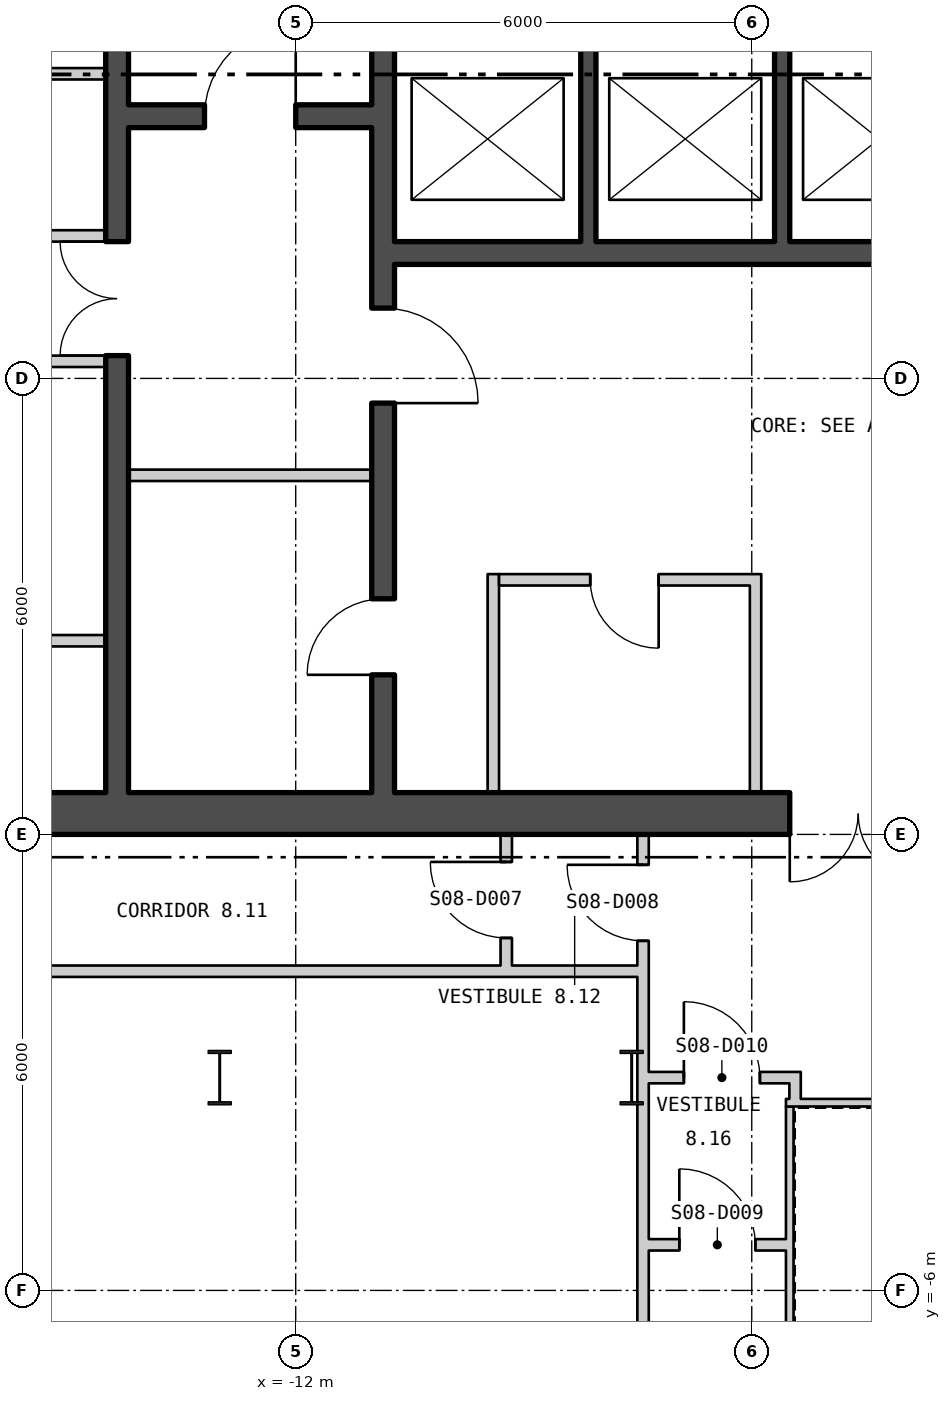
"""IFC4 building model, lengths in metres.
Left out: names, types, materials, properties, quantities, classifications, styles, units other than length and angle.
Written with IfcOpenShell. Run it as: python <this file> out.ifc"""

import sys

from ifc_helpers import new_model, si_unit, direction, frame, frame_2d, origin, origin_2d, place, context, subcontext, project, spatial, polyline, rectangle, i_section, outline, extrude, element, fill, save


model = new_model("IFC4")
c1 = context("Model", 3, precision=1e-05, world=origin(), true_north=direction((0.0, 1.0)))
c2 = subcontext(c1, "Body", "Model", "MODEL_VIEW")
j1 = project(units=[si_unit("LENGTHUNIT", "METRE"), si_unit("PLANEANGLEUNIT", "RADIAN")], contexts=[c1])
p1 = place(None, origin())
s1 = spatial("IfcSite", under=j1, at=p1, CompositionType="ELEMENT")
p2 = place(p1, origin())
s2 = spatial("IfcBuilding", under=s1, at=p2, CompositionType="ELEMENT")
p3 = place(p2, frame((0.0, 0.0, 111.3)))
s3 = spatial("IfcBuildingStorey", under=s2, at=p3, CompositionType="ELEMENT", Elevation=111.3)
for number, where, z_axis, x_axis in (
    (1, (-7.58, -3.2, 0.0), (0.0, 0.0, 1.0), (1.0, 0.0, 0.0)),
    (2, (-13.0, -3.2, 0.0), (0.0, 0.0, 1.0), (1.0, 0.0, 0.0)),
):
    element("IfcColumn", number, at=place(p3, frame(where, z_axis=z_axis, x_axis=x_axis)), inside=s3, PredefinedType="COLUMN", context=c2, shape_type="SweptSolid", body=[
        extrude(i_section(OverallWidth=0.304, OverallDepth=0.716, WebThickness=0.021, FlangeThickness=0.04, at=origin_2d()), origin(), (0.0, 0.0, 1.0), 4.5),
    ])
p4 = place(p3, frame((-27.595, 11.782, -0.18), z_axis=(0.0, 0.0, 1.0), x_axis=(0.500000141277, -0.866025322218, 0.0)))
e3 = element("IfcWall", 3, at=p4, inside=s3, PredefinedType="SOLIDWALL", context=c2, shape_type="SweptSolid", body=[
    extrude(outline(polyline([(-0.13, -0.225), (45.86, -0.225), (45.6, 0.225), (0.13, 0.225), (-0.13, -0.225)])), origin(), (0.0, 0.0, 1.0), 4.28),
])
p5 = place(p4, frame((1.424, 0.0, 1.08)))
e4 = element("IfcOpeningElement", 4, at=p5, cuts=e3, PredefinedType="OPENING", context=c2, shape_type="SweptSolid", body=[
    extrude(rectangle(XDim=2.4, YDim=2.6, at=frame_2d((1.2, 1.3))), frame((0.0, 0.235, 0.0), z_axis=(0.0, -1.0, 0.0), x_axis=(1.0, 0.0, 0.0)), (0.0, 0.0, 1.0), 0.47),
])
p6 = place(p4, frame((5.892, 0.0, 1.08)))
e5 = element("IfcOpeningElement", 5, at=p6, cuts=e3, PredefinedType="OPENING", context=c2, shape_type="SweptSolid", body=[
    extrude(rectangle(XDim=2.4, YDim=2.6, at=frame_2d((1.2, 1.3))), frame((0.0, 0.235, 0.0), z_axis=(0.0, -1.0, 0.0), x_axis=(1.0, 0.0, 0.0)), (0.0, 0.0, 1.0), 0.47),
])
p7 = place(p4, frame((10.399, 0.0, 1.08)))
e6 = element("IfcOpeningElement", 6, at=p7, cuts=e3, PredefinedType="OPENING", context=c2, shape_type="SweptSolid", body=[
    extrude(rectangle(XDim=2.4, YDim=2.6, at=frame_2d((1.2, 1.3))), frame((0.0, 0.235, 0.0), z_axis=(0.0, -1.0, 0.0), x_axis=(1.0, 0.0, 0.0)), (0.0, 0.0, 1.0), 0.47),
])
p8 = place(p4, frame((14.905, 0.0, 1.08)))
e7 = element("IfcOpeningElement", 7, at=p8, cuts=e3, PredefinedType="OPENING", context=c2, shape_type="SweptSolid", body=[
    extrude(rectangle(XDim=2.4, YDim=2.6, at=frame_2d((1.2, 1.3))), frame((0.0, 0.235, 0.0), z_axis=(0.0, -1.0, 0.0), x_axis=(1.0, 0.0, 0.0)), (0.0, 0.0, 1.0), 0.47),
])
p9 = place(p4, frame((19.412, 0.0, 1.08)))
e8 = element("IfcOpeningElement", 8, at=p9, cuts=e3, PredefinedType="OPENING", context=c2, shape_type="SweptSolid", body=[
    extrude(rectangle(XDim=2.4, YDim=2.6, at=frame_2d((1.2, 1.3))), frame((0.0, 0.235, 0.0), z_axis=(0.0, -1.0, 0.0), x_axis=(1.0, 0.0, 0.0)), (0.0, 0.0, 1.0), 0.47),
])
p10 = place(p4, frame((23.918, 0.0, 1.08)))
e9 = element("IfcOpeningElement", 9, at=p10, cuts=e3, PredefinedType="OPENING", context=c2, shape_type="SweptSolid", body=[
    extrude(rectangle(XDim=2.4, YDim=2.6, at=frame_2d((1.2, 1.3))), frame((0.0, 0.235, 0.0), z_axis=(0.0, -1.0, 0.0), x_axis=(1.0, 0.0, 0.0)), (0.0, 0.0, 1.0), 0.47),
])
p11 = place(p4, frame((28.425, 0.0, 1.08)))
e10 = element("IfcOpeningElement", 10, at=p11, cuts=e3, PredefinedType="OPENING", context=c2, shape_type="SweptSolid", body=[
    extrude(rectangle(XDim=2.4, YDim=2.6, at=frame_2d((1.2, 1.3))), frame((0.0, 0.235, 0.0), z_axis=(0.0, -1.0, 0.0), x_axis=(1.0, 0.0, 0.0)), (0.0, 0.0, 1.0), 0.47),
])
p12 = place(p4, frame((32.932, 0.0, 1.08)))
e11 = element("IfcOpeningElement", 11, at=p12, cuts=e3, PredefinedType="OPENING", context=c2, shape_type="SweptSolid", body=[
    extrude(rectangle(XDim=2.4, YDim=2.6, at=frame_2d((1.2, 1.3))), frame((0.0, 0.235, 0.0), z_axis=(0.0, -1.0, 0.0), x_axis=(1.0, 0.0, 0.0)), (0.0, 0.0, 1.0), 0.47),
])
p13 = place(p4, frame((37.438, 0.0, 1.08)))
e12 = element("IfcOpeningElement", 12, at=p13, cuts=e3, PredefinedType="OPENING", context=c2, shape_type="SweptSolid", body=[
    extrude(rectangle(XDim=2.4, YDim=2.6, at=frame_2d((1.2, 1.3))), frame((0.0, 0.235, 0.0), z_axis=(0.0, -1.0, 0.0), x_axis=(1.0, 0.0, 0.0)), (0.0, 0.0, 1.0), 0.47),
])
p14 = place(p4, frame((41.907, 0.0, 1.08)))
e13 = element("IfcOpeningElement", 13, at=p14, cuts=e3, PredefinedType="OPENING", context=c2, shape_type="SweptSolid", body=[
    extrude(rectangle(XDim=2.4, YDim=2.6, at=frame_2d((1.2, 1.3))), frame((0.0, 0.235, 0.0), z_axis=(0.0, -1.0, 0.0), x_axis=(1.0, 0.0, 0.0)), (0.0, 0.0, 1.0), 0.47),
])
p15 = place(p3, frame((5.55, -3.53, 0.0), z_axis=(0.0, 0.0, 1.0), x_axis=(-1.0, 0.0, 0.0)))
e14 = element("IfcWall", 14, at=p15, inside=s3, PredefinedType="PARTITIONING", context=c2, shape_type="SweptSolid", body=[
    extrude(rectangle(XDim=11.1, YDim=0.1, at=frame_2d((5.55, 0.0))), origin(), (0.0, 0.0, 1.0), 4.3),
])
p16 = place(p3, frame((-5.5, -3.58, 0.0), z_axis=(0.0, 0.0, 1.0), x_axis=(0.0, -1.0, 0.0)))
e15 = element("IfcWall", 15, at=p16, inside=s3, PredefinedType="PARTITIONING", context=c2, shape_type="SweptSolid", body=[
    extrude(rectangle(XDim=8.04, YDim=0.1, at=frame_2d((4.02, 0.0))), origin(), (0.0, 0.0, 1.0), 4.3),
])
p17 = place(p3, frame((-17.5, 0.275, 0.0), z_axis=(0.0, 0.0, 1.0), x_axis=(1.0, 0.0, 0.0)))
e16 = element("IfcWall", 16, at=p17, inside=s3, PredefinedType="SHEAR", context=c2, shape_type="SweptSolid", body=[
    extrude(rectangle(XDim=35.0, YDim=0.55, at=frame_2d((17.5, 0.0))), origin(), (0.0, 0.0, 1.0), 4.3),
])
p18 = place(p17, frame((12.0, 0.0, 0.0)))
e17 = element("IfcOpeningElement", 17, at=p18, cuts=e16, PredefinedType="OPENING", context=c2, shape_type="SweptSolid", body=[
    extrude(rectangle(XDim=1.8, YDim=2.4, at=frame_2d((0.9, 1.2))), frame((0.0, 0.285, 0.0), z_axis=(0.0, -1.0, 0.0), x_axis=(1.0, 0.0, 0.0)), (0.0, 0.0, 1.0), 0.57),
])
p19 = place(p17, frame((22.0, 0.0, 0.0)))
e18 = element("IfcOpeningElement", 18, at=p19, cuts=e16, PredefinedType="OPENING", context=c2, shape_type="SweptSolid", body=[
    extrude(rectangle(XDim=1.8, YDim=2.4, at=frame_2d((0.9, 1.2))), frame((0.0, 0.285, 0.0), z_axis=(0.0, -1.0, 0.0), x_axis=(1.0, 0.0, 0.0)), (0.0, 0.0, 1.0), 0.57),
])
p20 = place(p3, frame((-10.85, 0.55, 0.0), z_axis=(0.0, 0.0, 1.0), x_axis=(0.0, 1.0, 0.0)))
e19 = element("IfcWall", 19, at=p20, inside=s3, PredefinedType="SHEAR", context=c2, shape_type="SweptSolid", body=[
    extrude(rectangle(XDim=16.9, YDim=0.3, at=frame_2d((8.45, 0.0))), origin(), (0.0, 0.0, 1.0), 4.3),
])
p21 = place(p20, frame((5.125, 0.0, 0.0)))
e20 = element("IfcOpeningElement", 20, at=p21, cuts=e19, PredefinedType="OPENING", context=c2, shape_type="SweptSolid", body=[
    extrude(rectangle(XDim=1.25, YDim=2.1, at=frame_2d((0.625, 1.05))), frame((0.0, 0.16, 0.0), z_axis=(0.0, -1.0, 0.0), x_axis=(1.0, 0.0, 0.0)), (0.0, 0.0, 1.0), 0.32),
])
p22 = place(p20, frame((1.55, 0.0, 0.0)))
e21 = element("IfcOpeningElement", 21, at=p22, cuts=e19, PredefinedType="OPENING", context=c2, shape_type="SweptSolid", body=[
    extrude(rectangle(XDim=1.0, YDim=2.1, at=frame_2d((0.5, 1.05))), frame((0.0, 0.16, 0.0), z_axis=(0.0, -1.0, 0.0), x_axis=(1.0, 0.0, 0.0)), (0.0, 0.0, 1.0), 0.32),
])
p23 = place(p3, frame((-14.35, 0.55, 0.0), z_axis=(0.0, 0.0, 1.0), x_axis=(0.0, 1.0, 0.0)))
e22 = element("IfcWall", 22, at=p23, inside=s3, PredefinedType="SHEAR", context=c2, shape_type="SweptSolid", body=[
    extrude(rectangle(XDim=16.9, YDim=0.3, at=frame_2d((8.45, 0.0))), origin(), (0.0, 0.0, 1.0), 4.3),
])
p24 = place(p23, frame((5.75, 0.0, 0.0)))
e23 = element("IfcOpeningElement", 23, at=p24, cuts=e22, PredefinedType="OPENING", context=c2, shape_type="SweptSolid", body=[
    extrude(rectangle(XDim=1.5, YDim=2.1, at=frame_2d((0.75, 1.05))), frame((0.0, 0.16, 0.0), z_axis=(0.0, -1.0, 0.0), x_axis=(1.0, 0.0, 0.0)), (0.0, 0.0, 1.0), 0.32),
])
p25 = place(p3, frame((-14.2, 9.45, 0.0), z_axis=(0.0, 0.0, 1.0), x_axis=(1.0, 0.0, 0.0)))
e24 = element("IfcWall", 24, at=p25, inside=s3, PredefinedType="SHEAR", context=c2, shape_type="SweptSolid", body=[
    extrude(rectangle(XDim=3.2, YDim=0.3, at=frame_2d((1.6, 0.0))), origin(), (0.0, 0.0, 1.0), 4.3),
])
p26 = place(p25, frame((1.0, 0.0, 0.0)))
e25 = element("IfcOpeningElement", 25, at=p26, cuts=e24, PredefinedType="OPENING", context=c2, shape_type="SweptSolid", body=[
    extrude(rectangle(XDim=1.2, YDim=2.1, at=frame_2d((0.6, 1.05))), frame((0.0, 0.16, 0.0), z_axis=(0.0, -1.0, 0.0), x_axis=(1.0, 0.0, 0.0)), (0.0, 0.0, 1.0), 0.32),
])
p27 = place(p3, frame((-10.7, 7.65, 0.0), z_axis=(0.0, 0.0, 1.0), x_axis=(1.0, 0.0, 0.0)))
e26 = element("IfcWall", 26, at=p27, inside=s3, PredefinedType="SHEAR", context=c2, shape_type="SweptSolid", body=[
    extrude(rectangle(XDim=10.3, YDim=0.3, at=frame_2d((5.15, 0.0))), origin(), (0.0, 0.0, 1.0), 4.3),
])
for number, where, z_axis, x_axis in (
    (27, (-8.15, 7.8, 0.0), (0.0, 0.0, 1.0), (0.0, 1.0, 0.0)),
    (28, (-5.6, 7.8, 0.0), (0.0, 0.0, 1.0), (0.0, 1.0, 0.0)),
):
    element("IfcWall", number, at=place(p3, frame(where, z_axis=z_axis, x_axis=x_axis)), inside=s3, PredefinedType="SHEAR", context=c2, shape_type="SweptSolid", body=[
        extrude(rectangle(XDim=2.7, YDim=0.2, at=frame_2d((1.35, 0.0))), origin(), (0.0, 0.0, 1.0), 4.3),
    ])
p28 = place(p3, frame((-14.2, 4.725, 0.0), z_axis=(0.0, 0.0, 1.0), x_axis=(1.0, 0.0, 0.0)))
e29 = element("IfcWall", 29, at=p28, inside=s3, PredefinedType="PARTITIONING", context=c2, shape_type="SweptSolid", body=[
    extrude(rectangle(XDim=3.2, YDim=0.15, at=frame_2d((1.6, 0.0))), origin(), (0.0, 0.0, 1.0), 4.3),
])
for number, where, z_axis, x_axis in (
    (30, (-16.95, 6.225, 0.0), (0.0, 0.0, 1.0), (1.0, 0.0, 0.0)),
    (31, (-16.95, 7.875, 0.0), (0.0, 0.0, 1.0), (1.0, 0.0, 0.0)),
    (32, (-16.95, 2.549, 0.0), (0.0, 0.0, 1.0), (1.0, 0.0, 0.0)),
    (33, (-16.95, 10.008, 0.0), (0.0, 0.0, 1.0), (1.0, 0.0, 0.0)),
):
    element("IfcWall", number, at=place(p3, frame(where, z_axis=z_axis, x_axis=x_axis)), inside=s3, PredefinedType="PARTITIONING", context=c2, shape_type="SweptSolid", body=[
        extrude(rectangle(XDim=2.45, YDim=0.15, at=frame_2d((1.225, 0.0))), origin(), (0.0, 0.0, 1.0), 4.3),
    ])
for number, where, z_axis, x_axis in (
    (34, (-9.4, 0.55, 0.0), (0.0, 0.0, 1.0), (0.0, 1.0, 0.0)),
    (35, (-5.95, 0.55, 0.0), (0.0, 0.0, 1.0), (0.0, 1.0, 0.0)),
):
    element("IfcWall", number, at=place(p3, frame(where, z_axis=z_axis, x_axis=x_axis)), inside=s3, PredefinedType="PARTITIONING", context=c2, shape_type="SweptSolid", body=[
        extrude(rectangle(XDim=2.875, YDim=0.15, at=frame_2d((1.438, 0.0))), origin(), (0.0, 0.0, 1.0), 4.3),
    ])
p29 = place(p3, frame((-9.325, 3.35, 0.0), z_axis=(0.0, 0.0, 1.0), x_axis=(1.0, 0.0, 0.0)))
e36 = element("IfcWall", 36, at=p29, inside=s3, PredefinedType="PARTITIONING", context=c2, shape_type="SweptSolid", body=[
    extrude(rectangle(XDim=3.3, YDim=0.15, at=frame_2d((1.65, 0.0))), origin(), (0.0, 0.0, 1.0), 4.3),
])
p30 = place(p29, frame((1.2, 0.0, 0.0)))
e37 = element("IfcOpeningElement", 37, at=p30, cuts=e36, PredefinedType="OPENING", context=c2, shape_type="SweptSolid", body=[
    extrude(rectangle(XDim=0.9, YDim=2.1, at=frame_2d((0.45, 1.05))), frame((0.0, 0.085, 0.0), z_axis=(0.0, -1.0, 0.0), x_axis=(1.0, 0.0, 0.0)), (0.0, 0.0, 1.0), 0.17),
])
p31 = place(p3, frame((-19.225, -1.8, 0.0), z_axis=(0.0, 0.0, 1.0), x_axis=(1.0, 0.0, 0.0)))
e38 = element("IfcWall", 38, at=p31, inside=s3, PredefinedType="PARTITIONING", context=c2, shape_type="SweptSolid", body=[
    extrude(rectangle(XDim=11.72, YDim=0.15, at=frame_2d((5.86, 0.0))), origin(), (0.0, 0.0, 1.0), 4.3),
])
p32 = place(p3, frame((-9.23, -1.725, 0.0), z_axis=(0.0, 0.0, 1.0), x_axis=(0.0, 1.0, 0.0)))
e39 = element("IfcWall", 39, at=p32, inside=s3, PredefinedType="PARTITIONING", context=c2, shape_type="SweptSolid", body=[
    extrude(rectangle(XDim=1.725, YDim=0.15, at=frame_2d((0.863, 0.0))), origin(), (0.0, 0.0, 1.0), 4.3),
])
p33 = place(p32, frame((0.363, 0.0, 0.0)))
e40 = element("IfcOpeningElement", 40, at=p33, cuts=e39, PredefinedType="OPENING", context=c2, shape_type="SweptSolid", body=[
    extrude(rectangle(XDim=1.0, YDim=2.1, at=frame_2d((0.5, 1.05))), frame((0.0, 0.085, 0.0), z_axis=(0.0, -1.0, 0.0), x_axis=(1.0, 0.0, 0.0)), (0.0, 0.0, 1.0), 0.17),
])
p34 = place(p3, frame((-7.43, -13.675, 0.0), z_axis=(0.0, 0.0, 1.0), x_axis=(0.0, 1.0, 0.0)))
e41 = element("IfcWall", 41, at=p34, inside=s3, PredefinedType="PARTITIONING", context=c2, shape_type="SweptSolid", body=[
    extrude(rectangle(XDim=10.167, YDim=0.15, at=frame_2d((5.083, 0.0))), origin(), (0.0, 0.0, 1.0), 3.7),
])
p35 = place(p3, frame((-7.43, -3.508, 0.0), z_axis=(0.0, 0.0, 1.0), x_axis=(0.0, 1.0, 0.0)))
e42 = element("IfcWall", 42, at=p35, inside=s3, PredefinedType="PARTITIONING", context=c2, shape_type="SweptSolid", body=[
    extrude(rectangle(XDim=3.508, YDim=0.15, at=frame_2d((1.754, 0.0))), origin(), (0.0, 0.0, 1.0), 4.3),
])
p36 = place(p35, frame((2.108, 0.0, 0.0)))
e43 = element("IfcOpeningElement", 43, at=p36, cuts=e42, PredefinedType="OPENING", context=c2, shape_type="SweptSolid", body=[
    extrude(rectangle(XDim=1.0, YDim=2.1, at=frame_2d((0.5, 1.05))), frame((0.0, 0.085, 0.0), z_axis=(0.0, -1.0, 0.0), x_axis=(1.0, 0.0, 0.0)), (0.0, 0.0, 1.0), 0.17),
])
p37 = place(p3, frame((-7.355, -5.4, 0.0), z_axis=(0.0, 0.0, 1.0), x_axis=(1.0, 0.0, 0.0)))
e44 = element("IfcWall", 44, at=p37, inside=s3, PredefinedType="PARTITIONING", context=c2, shape_type="SweptSolid", body=[
    extrude(rectangle(XDim=1.805, YDim=0.15, at=frame_2d((0.902, 0.0))), origin(), (0.0, 0.0, 1.0), 4.3),
])
p38 = place(p37, frame((0.402, 0.0, 0.0)))
e45 = element("IfcOpeningElement", 45, at=p38, cuts=e44, PredefinedType="OPENING", context=c2, shape_type="SweptSolid", body=[
    extrude(rectangle(XDim=1.0, YDim=2.1, at=frame_2d((0.5, 1.05))), frame((0.0, 0.085, 0.0), z_axis=(0.0, -1.0, 0.0), x_axis=(1.0, 0.0, 0.0)), (0.0, 0.0, 1.0), 0.17),
])
p39 = place(p3, frame((-7.355, -3.2, 0.0), z_axis=(0.0, 0.0, 1.0), x_axis=(1.0, 0.0, 0.0)))
e46 = element("IfcWall", 46, at=p39, inside=s3, PredefinedType="PARTITIONING", context=c2, shape_type="SweptSolid", body=[
    extrude(rectangle(XDim=2.0, YDim=0.15, at=frame_2d((1.0, 0.0))), origin(), (0.0, 0.0, 1.0), 3.39),
])
p40 = place(p39, frame((0.462, 0.0, 0.0)))
e47 = element("IfcOpeningElement", 47, at=p40, cuts=e46, PredefinedType="OPENING", context=c2, shape_type="SweptSolid", body=[
    extrude(rectangle(XDim=1.0, YDim=2.1, at=frame_2d((0.5, 1.05))), frame((0.0, 0.085, 0.0), z_axis=(0.0, -1.0, 0.0), x_axis=(1.0, 0.0, 0.0)), (0.0, 0.0, 1.0), 0.17),
])
p41 = place(p3, frame((-5.43, -3.48, 0.0), z_axis=(0.0, 0.0, 1.0), x_axis=(0.0, 1.0, 0.0)))
e48 = element("IfcWall", 48, at=p41, inside=s3, PredefinedType="PARTITIONING", context=c2, shape_type="SweptSolid", body=[
    extrude(rectangle(XDim=0.205, YDim=0.15, at=frame_2d((0.102, 0.0))), origin(), (0.0, 0.0, 1.0), 4.3),
])
p42 = place(p26, origin())
e49 = element("IfcDoor", 49, at=p42, inside=s3, OperationType="SINGLE_SWING_LEFT", PredefinedType="DOOR", context=c2, shape_type="SweptSolid", body=[
    extrude(rectangle(XDim=1.2, YDim=2.1, at=frame_2d((0.6, 1.05))), frame((0.0, 0.025, 0.0), z_axis=(0.0, -1.0, 0.0), x_axis=(1.0, 0.0, 0.0)), (0.0, 0.0, 1.0), 0.05),
])
fill(e25, e49)
p43 = place(p21, origin())
e50 = element("IfcDoor", 50, at=p43, inside=s3, OperationType="SINGLE_SWING_LEFT", PredefinedType="DOOR", context=c2, shape_type="SweptSolid", body=[
    extrude(rectangle(XDim=1.25, YDim=2.1, at=frame_2d((0.625, 1.05))), frame((0.0, 0.025, 0.0), z_axis=(0.0, -1.0, 0.0), x_axis=(1.0, 0.0, 0.0)), (0.0, 0.0, 1.0), 0.05),
])
fill(e20, e50)
p44 = place(p22, origin())
e51 = element("IfcDoor", 51, at=p44, inside=s3, OperationType="SINGLE_SWING_RIGHT", PredefinedType="DOOR", context=c2, shape_type="SweptSolid", body=[
    extrude(rectangle(XDim=1.0, YDim=2.1, at=frame_2d((0.5, 1.05))), frame((0.0, 0.025, 0.0), z_axis=(0.0, -1.0, 0.0), x_axis=(1.0, 0.0, 0.0)), (0.0, 0.0, 1.0), 0.05),
])
fill(e21, e51)
p45 = place(p24, origin())
e52 = element("IfcDoor", 52, at=p45, inside=s3, OperationType="DOUBLE_DOOR_SINGLE_SWING", PredefinedType="DOOR", context=c2, shape_type="SweptSolid", body=[
    extrude(rectangle(XDim=1.5, YDim=2.1, at=frame_2d((0.75, 1.05))), frame((0.0, 0.025, 0.0), z_axis=(0.0, -1.0, 0.0), x_axis=(1.0, 0.0, 0.0)), (0.0, 0.0, 1.0), 0.05),
])
fill(e23, e52)
p46 = place(p30, origin())
e53 = element("IfcDoor", 53, at=p46, inside=s3, OperationType="SINGLE_SWING_RIGHT", PredefinedType="DOOR", context=c2, shape_type="SweptSolid", body=[
    extrude(rectangle(XDim=0.9, YDim=2.1, at=frame_2d((0.45, 1.05))), frame((0.0, 0.025, 0.0), z_axis=(0.0, -1.0, 0.0), x_axis=(1.0, 0.0, 0.0)), (0.0, 0.0, 1.0), 0.05),
])
fill(e37, e53)
p47 = place(p18, origin())
e54 = element("IfcDoor", 54, at=p47, inside=s3, OperationType="DOUBLE_DOOR_SINGLE_SWING", PredefinedType="DOOR", context=c2, shape_type="SweptSolid", body=[
    extrude(rectangle(XDim=1.8, YDim=2.4, at=frame_2d((0.9, 1.2))), frame((0.0, 0.025, 0.0), z_axis=(0.0, -1.0, 0.0), x_axis=(1.0, 0.0, 0.0)), (0.0, 0.0, 1.0), 0.05),
])
fill(e17, e54)
p48 = place(p33, origin())
e55 = element("IfcDoor", 55, at=p48, inside=s3, OperationType="SINGLE_SWING_LEFT", PredefinedType="DOOR", context=c2, shape_type="SweptSolid", body=[
    extrude(rectangle(XDim=1.0, YDim=2.1, at=frame_2d((0.5, 1.05))), frame((0.0, 0.025, 0.0), z_axis=(0.0, -1.0, 0.0), x_axis=(1.0, 0.0, 0.0)), (0.0, 0.0, 1.0), 0.05),
])
fill(e40, e55)
p49 = place(p36, origin())
e56 = element("IfcDoor", 56, at=p49, inside=s3, OperationType="SINGLE_SWING_LEFT", PredefinedType="DOOR", context=c2, shape_type="SweptSolid", body=[
    extrude(rectangle(XDim=1.0, YDim=2.1, at=frame_2d((0.5, 1.05))), frame((0.0, 0.025, 0.0), z_axis=(0.0, -1.0, 0.0), x_axis=(1.0, 0.0, 0.0)), (0.0, 0.0, 1.0), 0.05),
])
fill(e43, e56)
p50 = place(p38, origin())
e57 = element("IfcDoor", 57, at=p50, inside=s3, OperationType="SINGLE_SWING_RIGHT", PredefinedType="DOOR", context=c2, shape_type="SweptSolid", body=[
    extrude(rectangle(XDim=1.0, YDim=2.1, at=frame_2d((0.5, 1.05))), frame((0.0, 0.025, 0.0), z_axis=(0.0, -1.0, 0.0), x_axis=(1.0, 0.0, 0.0)), (0.0, 0.0, 1.0), 0.05),
])
fill(e45, e57)
p51 = place(p40, origin())
e58 = element("IfcDoor", 58, at=p51, inside=s3, OperationType="SINGLE_SWING_RIGHT", PredefinedType="DOOR", context=c2, shape_type="SweptSolid", body=[
    extrude(rectangle(XDim=1.0, YDim=2.1, at=frame_2d((0.5, 1.05))), frame((0.0, 0.025, 0.0), z_axis=(0.0, -1.0, 0.0), x_axis=(1.0, 0.0, 0.0)), (0.0, 0.0, 1.0), 0.05),
])
fill(e47, e58)
save(model, sys.argv[1])
